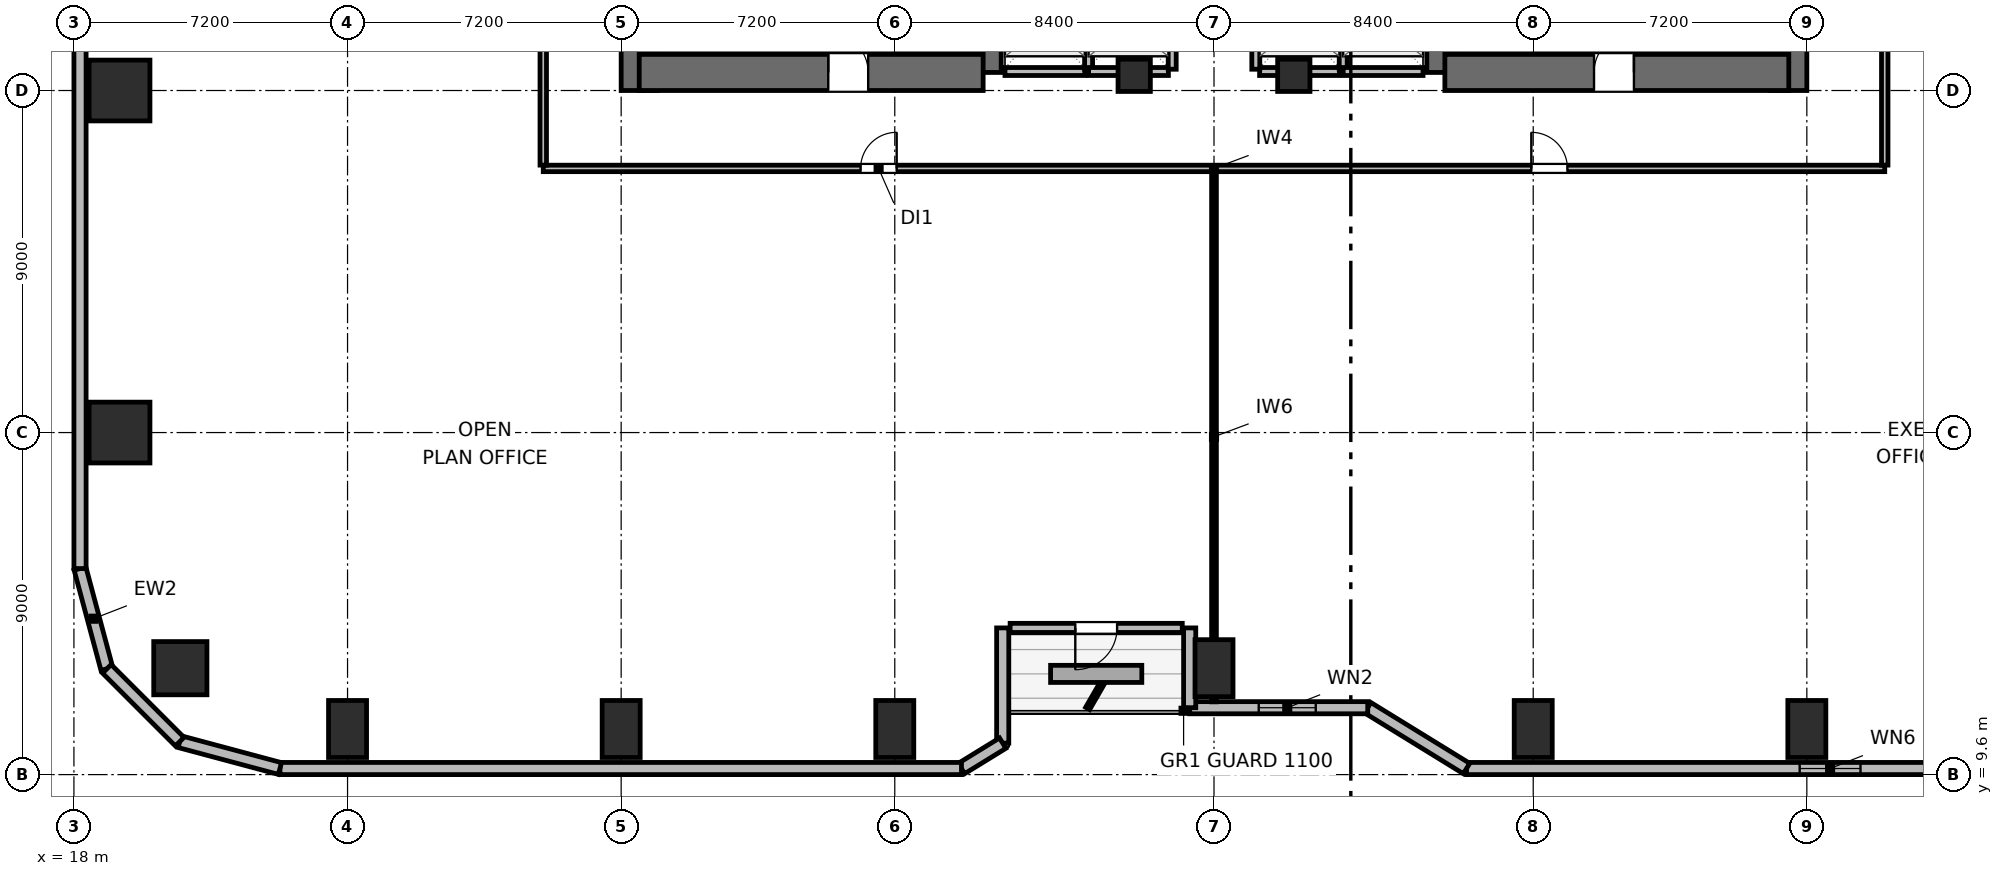
"""IFC4 building model, lengths in metres.
Left out: names, types, materials, properties, quantities, classifications, styles, units other than length and angle.
Written with IfcOpenShell. Run it as: python <this file> out.ifc"""

import sys

from ifc_helpers import new_model, si_unit, direction, frame, frame_2d, origin, origin_2d, place, context, subcontext, project, spatial, rectangle, circle, extrude, element, fill, save


model = new_model("IFC4")
c1 = context("Model", 3, precision=1e-05, world=origin(), true_north=direction((0.0, 1.0)))
c2 = subcontext(c1, "Body", "Model", "MODEL_VIEW")
j1 = project(units=[si_unit("LENGTHUNIT", "METRE"), si_unit("PLANEANGLEUNIT", "RADIAN")], contexts=[c1])
p1 = place(None, origin())
s1 = spatial("IfcSite", under=j1, at=p1, CompositionType="ELEMENT")
p2 = place(p1, origin())
s2 = spatial("IfcBuilding", under=s1, at=p2, CompositionType="ELEMENT")
p3 = place(p2, frame((0.0, 0.0, 21.6)))
s3 = spatial("IfcBuildingStorey", under=s2, at=p3, CompositionType="ELEMENT", Elevation=21.6)
p4 = place(p3, frame((32.875, 27.6, 0.0), z_axis=(0.0, 0.0, 1.0), x_axis=(0.0, 1.0, 0.0)))
e1 = element("IfcWall", 1, at=p4, inside=s3, PredefinedType="SHEAR", context=c2, shape_type="SweptSolid", body=[
    extrude(rectangle(XDim=16.8, YDim=0.95, at=frame_2d((8.4, 0.0))), origin(), (0.0, 0.0, 1.0), 3.9),
])
p5 = place(p3, frame((41.925, 28.075, 0.0), z_axis=(0.0, 0.0, 1.0), x_axis=(0.0, 1.0, 0.0)))
e2 = element("IfcWall", 2, at=p5, inside=s3, PredefinedType="SHEAR", context=c2, shape_type="SweptSolid", body=[
    extrude(rectangle(XDim=6.325, YDim=0.95, at=frame_2d((3.163, 0.0))), origin(), (0.0, 0.0, 1.0), 3.9),
])
p6 = place(p3, frame((32.875, 28.075, 0.0), z_axis=(0.0, 0.0, 1.0), x_axis=(1.0, 0.0, 0.0)))
e3 = element("IfcWall", 3, at=p6, inside=s3, PredefinedType="SHEAR", context=c2, shape_type="SweptSolid", body=[
    extrude(rectangle(XDim=9.05, YDim=0.95, at=frame_2d((4.525, 0.0))), origin(), (0.0, 0.0, 1.0), 3.9),
])
p7 = place(p6, frame((4.975, 0.0, 0.0)))
e4 = element("IfcOpeningElement", 4, at=p7, cuts=e3, PredefinedType="OPENING", context=c2, shape_type="SweptSolid", body=[
    extrude(rectangle(XDim=1.05, YDim=2.04, at=frame_2d((0.525, 1.02))), frame((0.0, 0.485, 0.0), z_axis=(0.0, -1.0, 0.0), x_axis=(1.0, 0.0, 0.0)), (0.0, 0.0, 1.0), 0.97),
])
p8 = place(p3, frame((54.075, 28.075, 0.0), z_axis=(0.0, 0.0, 1.0), x_axis=(0.0, 1.0, 0.0)))
e5 = element("IfcWall", 5, at=p8, inside=s3, PredefinedType="SHEAR", context=c2, shape_type="SweptSolid", body=[
    extrude(rectangle(XDim=7.725, YDim=0.95, at=frame_2d((3.863, 0.0))), origin(), (0.0, 0.0, 1.0), 3.9),
])
p9 = place(p3, frame((63.125, 27.6, 0.0), z_axis=(0.0, 0.0, 1.0), x_axis=(0.0, 1.0, 0.0)))
e6 = element("IfcWall", 6, at=p9, inside=s3, PredefinedType="SHEAR", context=c2, shape_type="SweptSolid", body=[
    extrude(rectangle(XDim=16.8, YDim=0.95, at=frame_2d((8.4, 0.0))), origin(), (0.0, 0.0, 1.0), 3.9),
])
p10 = place(p3, frame((54.075, 28.075, 0.0), z_axis=(0.0, 0.0, 1.0), x_axis=(1.0, 0.0, 0.0)))
e7 = element("IfcWall", 7, at=p10, inside=s3, PredefinedType="SHEAR", context=c2, shape_type="SweptSolid", body=[
    extrude(rectangle(XDim=9.05, YDim=0.95, at=frame_2d((4.525, 0.0))), origin(), (0.0, 0.0, 1.0), 3.9),
])
p11 = place(p10, frame((3.925, 0.0, 0.0)))
e8 = element("IfcOpeningElement", 8, at=p11, cuts=e7, PredefinedType="OPENING", context=c2, shape_type="SweptSolid", body=[
    extrude(rectangle(XDim=1.05, YDim=2.04, at=frame_2d((0.525, 1.02))), frame((0.0, 0.485, 0.0), z_axis=(0.0, -1.0, 0.0), x_axis=(1.0, 0.0, 0.0)), (0.0, 0.0, 1.0), 0.97),
])
p12 = place(p3, frame((20.8, 12.4, 0.0), z_axis=(0.0, 0.0, 1.0), x_axis=(1.0, 0.0, 0.0)))
e9 = element("IfcColumn", 9, at=p12, inside=s3, PredefinedType="COLUMN", context=c2, shape_type="SweptSolid", body=[
    extrude(circle(Radius=0.7, at=origin_2d()), origin(), (0.0, 0.0, 1.0), 3.9),
])
for number, where, z_axis, x_axis in (
    (10, (25.2, 10.8, 0.0), (0.0, 0.0, 1.0), (1.0, 0.0, 0.0)),
    (11, (32.4, 10.8, 0.0), (0.0, 0.0, 1.0), (1.0, 0.0, 0.0)),
    (12, (39.6, 10.8, 0.0), (0.0, 0.0, 1.0), (1.0, 0.0, 0.0)),
    (13, (48.0, 12.4, 0.0), (0.0, 0.0, 1.0), (1.0, 0.0, 0.0)),
    (14, (56.4, 10.8, 0.0), (0.0, 0.0, 1.0), (1.0, 0.0, 0.0)),
    (15, (63.6, 10.8, 0.0), (0.0, 0.0, 1.0), (1.0, 0.0, 0.0)),
):
    element("IfcColumn", number, at=place(p3, frame(where, z_axis=z_axis, x_axis=x_axis)), inside=s3, PredefinedType="COLUMN", context=c2, shape_type="SweptSolid", body=[
        extrude(rectangle(XDim=1.0, YDim=1.5, at=origin_2d()), origin(), (0.0, 0.0, 1.0), 3.9),
    ])
for number, where, z_axis, x_axis in (
    (16, (19.2, 18.6, 0.0), (0.0, 0.0, 1.0), (1.0, 0.0, 0.0)),
    (17, (19.2, 27.6, 0.0), (0.0, 0.0, 1.0), (1.0, 0.0, 0.0)),
):
    element("IfcColumn", number, at=place(p3, frame(where, z_axis=z_axis, x_axis=x_axis)), inside=s3, PredefinedType="COLUMN", context=c2, shape_type="SweptSolid", body=[
        extrude(rectangle(XDim=1.6, YDim=1.6, at=origin_2d()), origin(), (0.0, 0.0, 1.0), 3.9),
    ])
for number, where, z_axis, x_axis in (
    (18, (45.9, 28.0, 0.0), (0.0, 0.0, 1.0), (1.0, 0.0, 0.0)),
    (19, (50.1, 28.0, 0.0), (0.0, 0.0, 1.0), (1.0, 0.0, 0.0)),
):
    element("IfcColumn", number, at=place(p3, frame(where, z_axis=z_axis, x_axis=x_axis)), inside=s3, PredefinedType="COLUMN", context=c2, shape_type="SweptSolid", body=[
        extrude(rectangle(XDim=0.85, YDim=0.85, at=origin_2d()), origin(), (0.0, 0.0, 1.0), 3.9),
    ])
p13 = place(p3, frame((18.866, 12.383, 0.0), z_axis=(0.0, 0.0, 1.0), x_axis=(-0.25869736047, 0.965958423373, 0.0)))
e20 = element("IfcWall", 20, at=p13, inside=s3, PredefinedType="SOLIDWALL", context=c2, shape_type="SweptSolid", body=[
    extrude(rectangle(XDim=2.731, YDim=0.32, at=frame_2d((1.366, 0.0))), origin(), (0.0, 0.0, 1.0), 3.64),
])
p14 = place(p3, frame((18.16, 15.021, 0.0), z_axis=(0.0, 0.0, 1.0), x_axis=(0.0, 1.0, 0.0)))
e21 = element("IfcWall", 21, at=p14, inside=s3, PredefinedType="SOLIDWALL", context=c2, shape_type="SweptSolid", body=[
    extrude(rectangle(XDim=14.219, YDim=0.32, at=frame_2d((7.109, 0.0))), origin(), (0.0, 0.0, 1.0), 3.64),
])
p15 = place(p3, frame((73.779, 9.76, 0.0), z_axis=(0.0, 0.0, 1.0), x_axis=(-1.0, 0.0, 0.0)))
e22 = element("IfcWall", 22, at=p15, inside=s3, PredefinedType="SOLIDWALL", context=c2, shape_type="SweptSolid", body=[
    extrude(rectangle(XDim=19.134, YDim=0.32, at=frame_2d((9.567, 0.0))), origin(), (0.0, 0.0, 1.0), 3.64),
])
p16 = place(p15, frame((8.767, 0.0, 0.85)))
e23 = element("IfcOpeningElement", 23, at=p16, cuts=e22, PredefinedType="OPENING", context=c2, shape_type="SweptSolid", body=[
    extrude(rectangle(XDim=1.6, YDim=1.0, at=frame_2d((0.8, 0.5))), frame((0.0, 0.17, 0.0), z_axis=(0.0, -1.0, 0.0), x_axis=(1.0, 0.0, 0.0)), (0.0, 0.0, 1.0), 0.34),
])
p17 = place(p3, frame((54.645, 9.76, 0.0), z_axis=(0.0, 0.0, 1.0), x_axis=(-0.851630857047, 0.524142044989, 0.0)))
e24 = element("IfcWall", 24, at=p17, inside=s3, PredefinedType="SOLIDWALL", context=c2, shape_type="SweptSolid", body=[
    extrude(rectangle(XDim=3.053, YDim=0.32, at=frame_2d((1.526, 0.0))), origin(), (0.0, 0.0, 1.0), 2.875),
])
p18 = place(p3, frame((52.045, 11.36, 0.0), z_axis=(0.0, 0.0, 1.0), x_axis=(-1.0, 0.0, 0.0)))
e25 = element("IfcWall", 25, at=p18, inside=s3, PredefinedType="SOLIDWALL", context=c2, shape_type="SweptSolid", body=[
    extrude(rectangle(XDim=4.685, YDim=0.32, at=frame_2d((2.343, 0.0))), origin(), (0.0, 0.0, 1.0), 2.875),
])
p19 = place(p18, frame((1.368, 0.0, 0.85)))
e26 = element("IfcOpeningElement", 26, at=p19, cuts=e25, PredefinedType="OPENING", context=c2, shape_type="SweptSolid", body=[
    extrude(rectangle(XDim=1.5, YDim=1.1, at=frame_2d((0.75, 0.55))), frame((0.0, 0.17, 0.0), z_axis=(0.0, -1.0, 0.0), x_axis=(1.0, 0.0, 0.0)), (0.0, 0.0, 1.0), 0.34),
])
p20 = place(p3, frame((47.36, 11.36, 0.0), z_axis=(0.0, 0.0, 1.0), x_axis=(0.0, 1.0, 0.0)))
e27 = element("IfcWall", 27, at=p20, inside=s3, PredefinedType="SOLIDWALL", context=c2, shape_type="SweptSolid", body=[
    extrude(rectangle(XDim=2.1, YDim=0.32, at=frame_2d((1.05, 0.0))), origin(), (0.0, 0.0, 1.0), 2.875),
])
p21 = place(p3, frame((47.165, 13.46, 0.0), z_axis=(0.0, 0.0, 1.0), x_axis=(-1.0, 0.0, 0.0)))
e28 = element("IfcWall", 28, at=p21, inside=s3, PredefinedType="SOLIDWALL", context=c2, shape_type="SweptSolid", body=[
    extrude(rectangle(XDim=4.53, YDim=0.24, at=frame_2d((2.265, 0.0))), origin(), (0.0, 0.0, 1.0), 3.64),
])
p22 = place(p21, frame((1.715, 0.0, 0.0)))
e29 = element("IfcOpeningElement", 29, at=p22, cuts=e28, PredefinedType="OPENING", context=c2, shape_type="SweptSolid", body=[
    extrude(rectangle(XDim=1.1, YDim=2.04, at=frame_2d((0.55, 1.02))), frame((0.0, 0.13, 0.0), z_axis=(0.0, -1.0, 0.0), x_axis=(1.0, 0.0, 0.0)), (0.0, 0.0, 1.0), 0.26),
])
p23 = place(p3, frame((42.44, 13.46, 0.0), z_axis=(0.0, 0.0, 1.0), x_axis=(0.0, -1.0, 0.0)))
e30 = element("IfcWall", 30, at=p23, inside=s3, PredefinedType="SOLIDWALL", context=c2, shape_type="SweptSolid", body=[
    extrude(rectangle(XDim=3.032, YDim=0.32, at=frame_2d((1.516, 0.0))), origin(), (0.0, 0.0, 1.0), 2.875),
])
p24 = place(p3, frame((42.44, 10.427, 0.0), z_axis=(0.0, 0.0, 1.0), x_axis=(-0.851776724646, -0.523904964045, 0.0)))
e31 = element("IfcWall", 31, at=p24, inside=s3, PredefinedType="SOLIDWALL", context=c2, shape_type="SweptSolid", body=[
    extrude(rectangle(XDim=1.274, YDim=0.32, at=frame_2d((0.637, 0.0))), origin(), (0.0, 0.0, 1.0), 3.64),
])
p25 = place(p3, frame((41.355, 9.76, 0.0), z_axis=(0.0, 0.0, 1.0), x_axis=(-1.0, 0.0, 0.0)))
e32 = element("IfcWall", 32, at=p25, inside=s3, PredefinedType="SOLIDWALL", context=c2, shape_type="SweptSolid", body=[
    extrude(rectangle(XDim=17.934, YDim=0.32, at=frame_2d((8.967, 0.0))), origin(), (0.0, 0.0, 1.0), 3.64),
])
p26 = place(p3, frame((23.421, 9.76, 0.0), z_axis=(0.0, 0.0, 1.0), x_axis=(-0.965964405026, 0.25867502435, 0.0)))
e33 = element("IfcWall", 33, at=p26, inside=s3, PredefinedType="SOLIDWALL", context=c2, shape_type="SweptSolid", body=[
    extrude(rectangle(XDim=2.731, YDim=0.32, at=frame_2d((1.366, 0.0))), origin(), (0.0, 0.0, 1.0), 3.64),
])
p27 = place(p3, frame((20.783, 10.467, 0.0), z_axis=(0.0, 0.0, 1.0), x_axis=(-0.707106781187, 0.707106781187, 0.0)))
e34 = element("IfcWall", 34, at=p27, inside=s3, PredefinedType="SOLIDWALL", context=c2, shape_type="SweptSolid", body=[
    extrude(rectangle(XDim=2.71, YDim=0.32, at=frame_2d((1.355, 0.0))), origin(), (0.0, 0.0, 1.0), 3.64),
])
p28 = place(p3, frame((42.5, 28.1, 0.0), z_axis=(0.0, 0.0, 1.0), x_axis=(1.0, 0.0, 0.0)))
e35 = element("IfcWall", 35, at=p28, inside=s3, PredefinedType="PARTITIONING", context=c2, shape_type="SweptSolid", body=[
    extrude(rectangle(XDim=2.1, YDim=0.21, at=frame_2d((1.05, 0.0))), origin(), (0.0, 0.0, 1.0), 2.525),
])
p29 = place(p3, frame((44.7, 28.16, 0.0), z_axis=(0.0, 0.0, 1.0), x_axis=(0.0, 1.0, 0.0)))
e36 = element("IfcWall", 36, at=p29, inside=s3, PredefinedType="PARTITIONING", context=c2, shape_type="SweptSolid", body=[
    extrude(rectangle(XDim=2.28, YDim=0.21, at=frame_2d((1.14, 0.0))), origin(), (0.0, 0.0, 1.0), 3.64),
])
p30 = place(p3, frame((44.7, 28.1, 0.0), z_axis=(0.0, 0.0, 1.0), x_axis=(1.0, 0.0, 0.0)))
e37 = element("IfcWall", 37, at=p30, inside=s3, PredefinedType="PARTITIONING", context=c2, shape_type="SweptSolid", body=[
    extrude(rectangle(XDim=2.1, YDim=0.21, at=frame_2d((1.05, 0.0))), origin(), (0.0, 0.0, 1.0), 2.525),
])
p31 = place(p3, frame((46.9, 28.16, 0.0), z_axis=(0.0, 0.0, 1.0), x_axis=(0.0, 1.0, 0.0)))
e38 = element("IfcWall", 38, at=p31, inside=s3, PredefinedType="PARTITIONING", context=c2, shape_type="SweptSolid", body=[
    extrude(rectangle(XDim=2.28, YDim=0.21, at=frame_2d((1.14, 0.0))), origin(), (0.0, 0.0, 1.0), 3.64),
])
p32 = place(p3, frame((49.2, 28.1, 0.0), z_axis=(0.0, 0.0, 1.0), x_axis=(1.0, 0.0, 0.0)))
e39 = element("IfcWall", 39, at=p32, inside=s3, PredefinedType="PARTITIONING", context=c2, shape_type="SweptSolid", body=[
    extrude(rectangle(XDim=2.1, YDim=0.21, at=frame_2d((1.05, 0.0))), origin(), (0.0, 0.0, 1.0), 2.525),
])
for number, where, z_axis, x_axis in (
    (40, (49.1, 28.16, 0.0), (0.0, 0.0, 1.0), (0.0, 1.0, 0.0)),
    (41, (51.4, 28.16, 0.0), (0.0, 0.0, 1.0), (0.0, 1.0, 0.0)),
):
    element("IfcWall", number, at=place(p3, frame(where, z_axis=z_axis, x_axis=x_axis)), inside=s3, PredefinedType="PARTITIONING", context=c2, shape_type="SweptSolid", body=[
        extrude(rectangle(XDim=2.28, YDim=0.21, at=frame_2d((1.14, 0.0))), origin(), (0.0, 0.0, 1.0), 3.64),
    ])
p33 = place(p3, frame((51.4, 28.1, 0.0), z_axis=(0.0, 0.0, 1.0), x_axis=(1.0, 0.0, 0.0)))
e42 = element("IfcWall", 42, at=p33, inside=s3, PredefinedType="PARTITIONING", context=c2, shape_type="SweptSolid", body=[
    extrude(rectangle(XDim=2.1, YDim=0.21, at=frame_2d((1.05, 0.0))), origin(), (0.0, 0.0, 1.0), 2.525),
])
p34 = place(p3, frame((30.35, 25.55, 0.0), z_axis=(0.0, 0.0, 1.0), x_axis=(1.0, 0.0, 0.0)))
e43 = element("IfcWall", 43, at=p34, inside=s3, PredefinedType="PARTITIONING", context=c2, shape_type="SweptSolid", body=[
    extrude(rectangle(XDim=35.3, YDim=0.17, at=frame_2d((17.65, 0.0))), origin(), (0.0, 0.0, 1.0), 3.64),
])
p35 = place(p34, frame((8.35, 0.0, 0.0)))
e44 = element("IfcOpeningElement", 44, at=p35, cuts=e43, PredefinedType="OPENING", context=c2, shape_type="SweptSolid", body=[
    extrude(rectangle(XDim=0.95, YDim=2.04, at=frame_2d((0.475, 1.02))), frame((0.0, 0.095, 0.0), z_axis=(0.0, -1.0, 0.0), x_axis=(1.0, 0.0, 0.0)), (0.0, 0.0, 1.0), 0.19),
])
p36 = place(p34, frame((26.0, 0.0, 0.0)))
e45 = element("IfcOpeningElement", 45, at=p36, cuts=e43, PredefinedType="OPENING", context=c2, shape_type="SweptSolid", body=[
    extrude(rectangle(XDim=0.95, YDim=2.04, at=frame_2d((0.475, 1.02))), frame((0.0, 0.095, 0.0), z_axis=(0.0, -1.0, 0.0), x_axis=(1.0, 0.0, 0.0)), (0.0, 0.0, 1.0), 0.19),
])
p37 = place(p3, frame((30.35, 25.637, 0.0), z_axis=(0.0, 0.0, 1.0), x_axis=(0.0, 1.0, 0.0)))
e46 = element("IfcWall", 46, at=p37, inside=s3, PredefinedType="PARTITIONING", context=c2, shape_type="SweptSolid", body=[
    extrude(rectangle(XDim=20.726, YDim=0.17, at=frame_2d((10.363, 0.0))), origin(), (0.0, 0.0, 1.0), 3.64),
])
p38 = place(p37, frame((4.263, 0.0, 0.0)))
e47 = element("IfcOpeningElement", 47, at=p38, cuts=e46, PredefinedType="OPENING", context=c2, shape_type="SweptSolid", body=[
    extrude(rectangle(XDim=0.95, YDim=2.04, at=frame_2d((0.475, 1.02))), frame((0.0, 0.095, 0.0), z_axis=(0.0, -1.0, 0.0), x_axis=(1.0, 0.0, 0.0)), (0.0, 0.0, 1.0), 0.19),
])
p39 = place(p37, frame((14.713, 0.0, 0.0)))
e48 = element("IfcOpeningElement", 48, at=p39, cuts=e46, PredefinedType="OPENING", context=c2, shape_type="SweptSolid", body=[
    extrude(rectangle(XDim=0.95, YDim=2.04, at=frame_2d((0.475, 1.02))), frame((0.0, 0.095, 0.0), z_axis=(0.0, -1.0, 0.0), x_axis=(1.0, 0.0, 0.0)), (0.0, 0.0, 1.0), 0.19),
])
p40 = place(p3, frame((65.65, 25.637, 0.0), z_axis=(0.0, 0.0, 1.0), x_axis=(0.0, 1.0, 0.0)))
e49 = element("IfcWall", 49, at=p40, inside=s3, PredefinedType="PARTITIONING", context=c2, shape_type="SweptSolid", body=[
    extrude(rectangle(XDim=20.726, YDim=0.17, at=frame_2d((10.363, 0.0))), origin(), (0.0, 0.0, 1.0), 3.64),
])
p41 = place(p40, frame((4.163, 0.0, 0.0)))
e50 = element("IfcOpeningElement", 50, at=p41, cuts=e49, PredefinedType="OPENING", context=c2, shape_type="SweptSolid", body=[
    extrude(rectangle(XDim=0.95, YDim=2.04, at=frame_2d((0.475, 1.02))), frame((0.0, 0.095, 0.0), z_axis=(0.0, -1.0, 0.0), x_axis=(1.0, 0.0, 0.0)), (0.0, 0.0, 1.0), 0.19),
])
p42 = place(p40, frame((14.613, 0.0, 0.0)))
e51 = element("IfcOpeningElement", 51, at=p42, cuts=e49, PredefinedType="OPENING", context=c2, shape_type="SweptSolid", body=[
    extrude(rectangle(XDim=0.95, YDim=2.04, at=frame_2d((0.475, 1.02))), frame((0.0, 0.095, 0.0), z_axis=(0.0, -1.0, 0.0), x_axis=(1.0, 0.0, 0.0)), (0.0, 0.0, 1.0), 0.19),
])
p43 = place(p3, frame((48.0, 11.515, 0.0), z_axis=(0.0, 0.0, 1.0), x_axis=(0.0, 1.0, 0.0)))
e52 = element("IfcWall", 52, at=p43, inside=s3, PredefinedType="PARTITIONING", context=c2, shape_type="SweptSolid", body=[
    extrude(rectangle(XDim=13.948, YDim=0.125, at=frame_2d((6.974, 0.0))), origin(), (0.0, 0.0, 1.0), 2.93),
])
p44 = place(p16, origin())
e53 = element("IfcWindow", 53, at=p44, inside=s3, PartitioningType="SINGLE_PANEL", PredefinedType="WINDOW", context=c2, shape_type="SweptSolid", body=[
    extrude(rectangle(XDim=1.6, YDim=1.0, at=frame_2d((0.8, 0.5))), frame((0.0, 0.03, 0.0), z_axis=(0.0, -1.0, 0.0), x_axis=(1.0, 0.0, 0.0)), (0.0, 0.0, 1.0), 0.06),
])
fill(e23, e53)
p45 = place(p19, origin())
e54 = element("IfcWindow", 54, at=p45, inside=s3, PartitioningType="SINGLE_PANEL", PredefinedType="WINDOW", context=c2, shape_type="SweptSolid", body=[
    extrude(rectangle(XDim=1.5, YDim=1.1, at=frame_2d((0.75, 0.55))), frame((0.0, 0.03, 0.0), z_axis=(0.0, -1.0, 0.0), x_axis=(1.0, 0.0, 0.0)), (0.0, 0.0, 1.0), 0.06),
])
fill(e26, e54)
p46 = place(p22, origin())
e55 = element("IfcDoor", 55, at=p46, inside=s3, OperationType="SINGLE_SWING_RIGHT", PredefinedType="DOOR", context=c2, shape_type="SweptSolid", body=[
    extrude(rectangle(XDim=1.1, YDim=2.04, at=frame_2d((0.55, 1.02))), frame((0.0, 0.025, 0.0), z_axis=(0.0, -1.0, 0.0), x_axis=(1.0, 0.0, 0.0)), (0.0, 0.0, 1.0), 0.05),
])
fill(e29, e55)
p47 = place(p7, origin())
e56 = element("IfcDoor", 56, at=p47, inside=s3, OperationType="SINGLE_SWING_LEFT", PredefinedType="DOOR", context=c2, shape_type="SweptSolid", body=[
    extrude(rectangle(XDim=1.05, YDim=2.04, at=frame_2d((0.525, 1.02))), frame((0.0, 0.025, 0.0), z_axis=(0.0, -1.0, 0.0), x_axis=(1.0, 0.0, 0.0)), (0.0, 0.0, 1.0), 0.05),
])
fill(e4, e56)
p48 = place(p11, origin())
e57 = element("IfcDoor", 57, at=p48, inside=s3, OperationType="SINGLE_SWING_RIGHT", PredefinedType="DOOR", context=c2, shape_type="SweptSolid", body=[
    extrude(rectangle(XDim=1.05, YDim=2.04, at=frame_2d((0.525, 1.02))), frame((0.0, 0.025, 0.0), z_axis=(0.0, -1.0, 0.0), x_axis=(1.0, 0.0, 0.0)), (0.0, 0.0, 1.0), 0.05),
])
fill(e8, e57)
p49 = place(p35, origin())
e58 = element("IfcDoor", 58, at=p49, inside=s3, OperationType="SINGLE_SWING_RIGHT", PredefinedType="DOOR", context=c2, shape_type="SweptSolid", body=[
    extrude(rectangle(XDim=0.95, YDim=2.04, at=frame_2d((0.475, 1.02))), frame((0.0, 0.025, 0.0), z_axis=(0.0, -1.0, 0.0), x_axis=(1.0, 0.0, 0.0)), (0.0, 0.0, 1.0), 0.05),
])
fill(e44, e58)
p50 = place(p36, origin())
e59 = element("IfcDoor", 59, at=p50, inside=s3, OperationType="SINGLE_SWING_LEFT", PredefinedType="DOOR", context=c2, shape_type="SweptSolid", body=[
    extrude(rectangle(XDim=0.95, YDim=2.04, at=frame_2d((0.475, 1.02))), frame((0.0, 0.025, 0.0), z_axis=(0.0, -1.0, 0.0), x_axis=(1.0, 0.0, 0.0)), (0.0, 0.0, 1.0), 0.05),
])
fill(e45, e59)
save(model, sys.argv[1])
